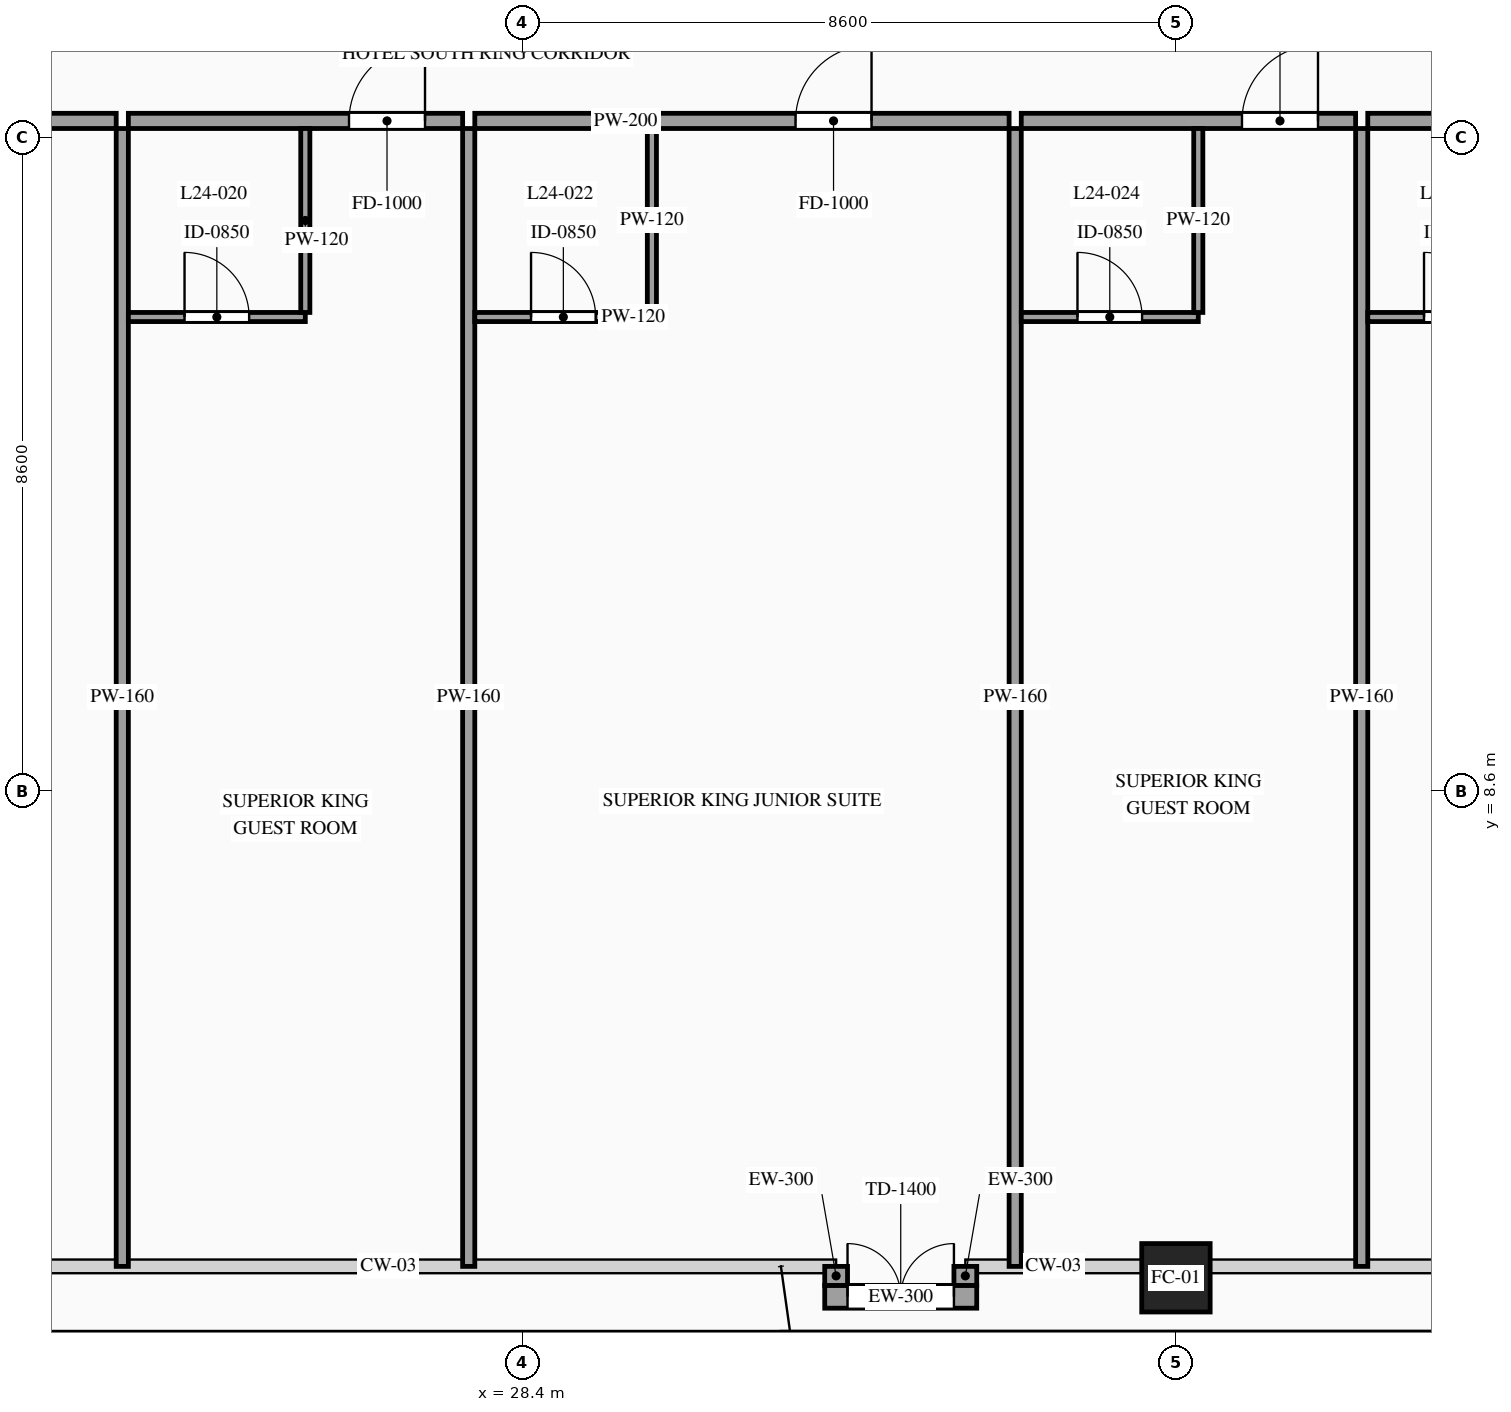
"""IFC4 building model, lengths in metres.
Left out: names, types, materials, properties, quantities, classifications, styles, units other than length and angle.
Written with IfcOpenShell. Run it as: python <this file> out.ifc"""

import sys

from ifc_helpers import new_model, si_unit, direction, frame, frame_2d, origin, origin_2d, place, context, subcontext, project, spatial, rectangle, hollow_rectangle, extrude, source, transform, mapped, element, fill, save


model = new_model("IFC4")
c1 = context("Model", 3, precision=1e-05, world=origin(), true_north=direction((0.0, 1.0)))
c2 = subcontext(c1, "Body", "Model", "MODEL_VIEW")
j1 = project(units=[si_unit("LENGTHUNIT", "METRE"), si_unit("PLANEANGLEUNIT", "RADIAN")], contexts=[c1])
p1 = place(None, origin())
s1 = spatial("IfcSite", under=j1, at=p1, CompositionType="ELEMENT")
p2 = place(p1, origin())
s2 = spatial("IfcBuilding", under=s1, at=p2, CompositionType="ELEMENT")
p3 = place(p2, frame((0.0, 0.0, 93.8)))
s3 = spatial("IfcBuildingStorey", under=s2, at=p3, CompositionType="ELEMENT", Elevation=93.8)
m1 = source(origin(), c2, "Body", "SweptSolid", [
    extrude(hollow_rectangle(XDim=0.9, YDim=0.9, WallThickness=0.042, at=origin_2d()), origin(), (0.0, 0.0, 1.0), 3.6),
])
p4 = place(p3, frame((37.0, 2.2, 0.0), z_axis=(0.0, 0.0, 1.0), x_axis=(1.0, 0.0, 0.0)))
e1 = element("IfcColumn", 1, at=p4, inside=s3, PredefinedType="COLUMN", context=c2, shape_type="MappedRepresentation", body=[
    mapped(m1, transform((0.0, 0.0, 0.0), scale=1.0)),
])
p5 = place(p3, frame((32.379, 1.95, 0.0), z_axis=(0.0, 0.0, 1.0), x_axis=(1.0, 0.0, 0.0)))
e2 = element("IfcWall", 2, at=p5, inside=s3, PredefinedType="SOLIDWALL", context=c2, shape_type="SweptSolid", body=[
    extrude(rectangle(XDim=2.0, YDim=0.3, at=frame_2d((1.0, 0.0))), origin(), (0.0, 0.0, 1.0), 3.38),
])
p6 = place(p5, frame((0.3, 0.0, 0.0)))
e3 = element("IfcOpeningElement", 3, at=p6, cuts=e2, PredefinedType="OPENING", context=c2, shape_type="SweptSolid", body=[
    extrude(rectangle(XDim=1.4, YDim=2.3, at=frame_2d((0.7, 1.15))), frame((0.0, 0.165, 0.0), z_axis=(0.0, -1.0, 0.0), x_axis=(1.0, 0.0, 0.0)), (0.0, 0.0, 1.0), 0.33),
])
m2 = source(origin(), c2, "Body", "SweptSolid", [
    extrude(rectangle(XDim=0.25, YDim=0.3, at=frame_2d((0.125, 0.0))), origin(), (0.0, 0.0, 1.0), 3.38),
])
for number, where, z_axis, x_axis in (
    (4, (32.529, 2.35, 0.0), (0.0, 0.0, 1.0), (0.0, -1.0, 0.0)),
    (5, (34.229, 2.1, 0.0), (0.0, 0.0, 1.0), (0.0, 1.0, 0.0)),
):
    element("IfcWall", number, at=place(p3, frame(where, z_axis=z_axis, x_axis=x_axis)), inside=s3, PredefinedType="SOLIDWALL", context=c2, shape_type="MappedRepresentation", body=[
        mapped(m2, transform((0.0, 0.0, 0.0), scale=1.0)),
    ])
p7 = place(p3, frame((16.44, 17.42, 0.0), z_axis=(0.0, 0.0, 1.0), x_axis=(1.0, 0.0, 0.0)))
e6 = element("IfcWall", 6, at=p7, inside=s3, PredefinedType="PARTITIONING", context=c2, shape_type="SweptSolid", body=[
    extrude(rectangle(XDim=6.617, YDim=0.2, at=frame_2d((3.309, 0.0))), origin(), (0.0, 0.0, 1.0), 3.38),
])
p8 = place(p7, frame((4.013, 0.0, 0.0)))
e7 = element("IfcOpeningElement", 7, at=p8, cuts=e6, PredefinedType="OPENING", context=c2, shape_type="SweptSolid", body=[
    extrude(rectangle(XDim=1.0, YDim=2.2, at=frame_2d((0.5, 1.1))), frame((0.0, 0.115, 0.0), z_axis=(0.0, -1.0, 0.0), x_axis=(1.0, 0.0, 0.0)), (0.0, 0.0, 1.0), 0.23),
])
m3 = source(origin(), c2, "Body", "SweptSolid", [
    extrude(rectangle(XDim=14.97, YDim=0.16, at=frame_2d((7.485, 0.0))), origin(), (0.0, 0.0, 1.0), 3.38),
])
p9 = place(p3, frame((23.137, 2.35, 0.0), z_axis=(0.0, 0.0, 1.0), x_axis=(0.0, 1.0, 0.0)))
e8 = element("IfcWall", 8, at=p9, inside=s3, PredefinedType="PARTITIONING", context=c2, shape_type="MappedRepresentation", body=[
    mapped(m3, transform((0.0, 0.0, 0.0), scale=1.0)),
])
p10 = place(p3, frame((23.217, 17.42, 0.0), z_axis=(0.0, 0.0, 1.0), x_axis=(1.0, 0.0, 0.0)))
e9 = element("IfcWall", 9, at=p10, inside=s3, PredefinedType="PARTITIONING", context=c2, shape_type="SweptSolid", body=[
    extrude(rectangle(XDim=4.398, YDim=0.2, at=frame_2d((2.199, 0.0))), origin(), (0.0, 0.0, 1.0), 3.38),
])
p11 = place(p10, frame((2.903, 0.0, 0.0)))
e10 = element("IfcOpeningElement", 10, at=p11, cuts=e9, PredefinedType="OPENING", context=c2, shape_type="SweptSolid", body=[
    extrude(rectangle(XDim=1.0, YDim=2.2, at=frame_2d((0.5, 1.1))), frame((0.0, 0.115, 0.0), z_axis=(0.0, -1.0, 0.0), x_axis=(1.0, 0.0, 0.0)), (0.0, 0.0, 1.0), 0.23),
])
p12 = place(p3, frame((27.695, 2.35, 0.0), z_axis=(0.0, 0.0, 1.0), x_axis=(0.0, 1.0, 0.0)))
e11 = element("IfcWall", 11, at=p12, inside=s3, PredefinedType="PARTITIONING", context=c2, shape_type="MappedRepresentation", body=[
    mapped(m3, transform((0.0, 0.0, 0.0), scale=1.0)),
])
p13 = place(p3, frame((23.217, 14.84, 0.0), z_axis=(0.0, 0.0, 1.0), x_axis=(1.0, 0.0, 0.0)))
e12 = element("IfcWall", 12, at=p13, inside=s3, PredefinedType="PARTITIONING", context=c2, shape_type="SweptSolid", body=[
    extrude(rectangle(XDim=2.328, YDim=0.12, at=frame_2d((1.164, 0.0))), origin(), (0.0, 0.0, 1.0), 3.38),
])
p14 = place(p13, frame((0.739, 0.0, 0.0)))
e13 = element("IfcOpeningElement", 13, at=p14, cuts=e12, PredefinedType="OPENING", context=c2, shape_type="SweptSolid", body=[
    extrude(rectangle(XDim=0.85, YDim=2.1, at=frame_2d((0.425, 1.05))), frame((0.0, 0.075, 0.0), z_axis=(0.0, -1.0, 0.0), x_axis=(1.0, 0.0, 0.0)), (0.0, 0.0, 1.0), 0.15),
])
m4 = source(origin(), c2, "Body", "SweptSolid", [
    extrude(rectangle(XDim=2.42, YDim=0.12, at=frame_2d((1.21, 0.0))), origin(), (0.0, 0.0, 1.0), 3.38),
])
p15 = place(p3, frame((25.545, 14.9, 0.0), z_axis=(0.0, 0.0, 1.0), x_axis=(0.0, 1.0, 0.0)))
e14 = element("IfcWall", 14, at=p15, inside=s3, PredefinedType="PARTITIONING", context=c2, shape_type="MappedRepresentation", body=[
    mapped(m4, transform((0.0, 0.0, 0.0), scale=1.0)),
])
p16 = place(p3, frame((27.775, 17.42, 0.0), z_axis=(0.0, 0.0, 1.0), x_axis=(1.0, 0.0, 0.0)))
e15 = element("IfcWall", 15, at=p16, inside=s3, PredefinedType="PARTITIONING", context=c2, shape_type="SweptSolid", body=[
    extrude(rectangle(XDim=7.03, YDim=0.2, at=frame_2d((3.515, 0.0))), origin(), (0.0, 0.0, 1.0), 3.38),
])
p17 = place(p16, frame((4.22, 0.0, 0.0)))
e16 = element("IfcOpeningElement", 16, at=p17, cuts=e15, PredefinedType="OPENING", context=c2, shape_type="SweptSolid", body=[
    extrude(rectangle(XDim=1.0, YDim=2.2, at=frame_2d((0.5, 1.1))), frame((0.0, 0.115, 0.0), z_axis=(0.0, -1.0, 0.0), x_axis=(1.0, 0.0, 0.0)), (0.0, 0.0, 1.0), 0.23),
])
p18 = place(p3, frame((34.885, 2.35, 0.0), z_axis=(0.0, 0.0, 1.0), x_axis=(0.0, 1.0, 0.0)))
e17 = element("IfcWall", 17, at=p18, inside=s3, PredefinedType="PARTITIONING", context=c2, shape_type="MappedRepresentation", body=[
    mapped(m3, transform((0.0, 0.0, 0.0), scale=1.0)),
])
p19 = place(p3, frame((27.775, 14.84, 0.0), z_axis=(0.0, 0.0, 1.0), x_axis=(1.0, 0.0, 0.0)))
e18 = element("IfcWall", 18, at=p19, inside=s3, PredefinedType="PARTITIONING", context=c2, shape_type="SweptSolid", body=[
    extrude(rectangle(XDim=2.33, YDim=0.12, at=frame_2d((1.165, 0.0))), origin(), (0.0, 0.0, 1.0), 3.38),
])
p20 = place(p19, frame((0.74, 0.0, 0.0)))
e19 = element("IfcOpeningElement", 19, at=p20, cuts=e18, PredefinedType="OPENING", context=c2, shape_type="SweptSolid", body=[
    extrude(rectangle(XDim=0.85, YDim=2.1, at=frame_2d((0.425, 1.05))), frame((0.0, 0.075, 0.0), z_axis=(0.0, -1.0, 0.0), x_axis=(1.0, 0.0, 0.0)), (0.0, 0.0, 1.0), 0.15),
])
p21 = place(p3, frame((30.105, 14.9, 0.0), z_axis=(0.0, 0.0, 1.0), x_axis=(0.0, 1.0, 0.0)))
e20 = element("IfcWall", 20, at=p21, inside=s3, PredefinedType="PARTITIONING", context=c2, shape_type="MappedRepresentation", body=[
    mapped(m4, transform((0.0, 0.0, 0.0), scale=1.0)),
])
p22 = place(p3, frame((34.965, 17.42, 0.0), z_axis=(0.0, 0.0, 1.0), x_axis=(1.0, 0.0, 0.0)))
e21 = element("IfcWall", 21, at=p22, inside=s3, PredefinedType="PARTITIONING", context=c2, shape_type="SweptSolid", body=[
    extrude(rectangle(XDim=4.399, YDim=0.2, at=frame_2d((2.199, 0.0))), origin(), (0.0, 0.0, 1.0), 3.38),
])
p23 = place(p22, frame((2.904, 0.0, 0.0)))
e22 = element("IfcOpeningElement", 22, at=p23, cuts=e21, PredefinedType="OPENING", context=c2, shape_type="SweptSolid", body=[
    extrude(rectangle(XDim=1.0, YDim=2.2, at=frame_2d((0.5, 1.1))), frame((0.0, 0.115, 0.0), z_axis=(0.0, -1.0, 0.0), x_axis=(1.0, 0.0, 0.0)), (0.0, 0.0, 1.0), 0.23),
])
p24 = place(p3, frame((39.444, 2.35, 0.0), z_axis=(0.0, 0.0, 1.0), x_axis=(0.0, 1.0, 0.0)))
e23 = element("IfcWall", 23, at=p24, inside=s3, PredefinedType="PARTITIONING", context=c2, shape_type="MappedRepresentation", body=[
    mapped(m3, transform((0.0, 0.0, 0.0), scale=1.0)),
])
p25 = place(p3, frame((34.965, 14.84, 0.0), z_axis=(0.0, 0.0, 1.0), x_axis=(1.0, 0.0, 0.0)))
e24 = element("IfcWall", 24, at=p25, inside=s3, PredefinedType="PARTITIONING", context=c2, shape_type="SweptSolid", body=[
    extrude(rectangle(XDim=2.329, YDim=0.12, at=frame_2d((1.165, 0.0))), origin(), (0.0, 0.0, 1.0), 3.38),
])
p26 = place(p25, frame((0.74, 0.0, 0.0)))
e25 = element("IfcOpeningElement", 25, at=p26, cuts=e24, PredefinedType="OPENING", context=c2, shape_type="SweptSolid", body=[
    extrude(rectangle(XDim=0.85, YDim=2.1, at=frame_2d((0.425, 1.05))), frame((0.0, 0.075, 0.0), z_axis=(0.0, -1.0, 0.0), x_axis=(1.0, 0.0, 0.0)), (0.0, 0.0, 1.0), 0.15),
])
p27 = place(p3, frame((37.294, 14.9, 0.0), z_axis=(0.0, 0.0, 1.0), x_axis=(0.0, 1.0, 0.0)))
e26 = element("IfcWall", 26, at=p27, inside=s3, PredefinedType="PARTITIONING", context=c2, shape_type="MappedRepresentation", body=[
    mapped(m4, transform((0.0, 0.0, 0.0), scale=1.0)),
])
p28 = place(p3, frame((39.524, 17.42, 0.0), z_axis=(0.0, 0.0, 1.0), x_axis=(1.0, 0.0, 0.0)))
e27 = element("IfcWall", 27, at=p28, inside=s3, PredefinedType="PARTITIONING", context=c2, shape_type="SweptSolid", body=[
    extrude(rectangle(XDim=7.03, YDim=0.2, at=frame_2d((3.515, 0.0))), origin(), (0.0, 0.0, 1.0), 3.38),
])
p29 = place(p28, frame((4.22, 0.0, 0.0)))
e28 = element("IfcOpeningElement", 28, at=p29, cuts=e27, PredefinedType="OPENING", context=c2, shape_type="SweptSolid", body=[
    extrude(rectangle(XDim=1.0, YDim=2.2, at=frame_2d((0.5, 1.1))), frame((0.0, 0.115, 0.0), z_axis=(0.0, -1.0, 0.0), x_axis=(1.0, 0.0, 0.0)), (0.0, 0.0, 1.0), 0.23),
])
p30 = place(p3, frame((39.524, 14.84, 0.0), z_axis=(0.0, 0.0, 1.0), x_axis=(1.0, 0.0, 0.0)))
e29 = element("IfcWall", 29, at=p30, inside=s3, PredefinedType="PARTITIONING", context=c2, shape_type="SweptSolid", body=[
    extrude(rectangle(XDim=2.33, YDim=0.12, at=frame_2d((1.165, 0.0))), origin(), (0.0, 0.0, 1.0), 3.38),
])
p31 = place(p30, frame((0.74, 0.0, 0.0)))
e30 = element("IfcOpeningElement", 30, at=p31, cuts=e29, PredefinedType="OPENING", context=c2, shape_type="SweptSolid", body=[
    extrude(rectangle(XDim=0.85, YDim=2.1, at=frame_2d((0.425, 1.05))), frame((0.0, 0.075, 0.0), z_axis=(0.0, -1.0, 0.0), x_axis=(1.0, 0.0, 0.0)), (0.0, 0.0, 1.0), 0.15),
])
m5 = source(origin(), c2, "Body", "SweptSolid", [
    extrude(rectangle(XDim=1.4, YDim=2.3, at=frame_2d((0.7, 1.15))), frame((0.0, 0.025, 0.0), z_axis=(0.0, -1.0, 0.0), x_axis=(1.0, 0.0, 0.0)), (0.0, 0.0, 1.0), 0.05),
])
p32 = place(p6, origin())
e31 = element("IfcDoor", 31, at=p32, inside=s3, OperationType="DOUBLE_DOOR_SINGLE_SWING", PredefinedType="DOOR", context=c2, shape_type="MappedRepresentation", body=[
    mapped(m5, transform((0.0, 0.0, 0.0), scale=1.0)),
])
fill(e3, e31)
m6 = source(origin(), c2, "Body", "SweptSolid", [
    extrude(rectangle(XDim=1.0, YDim=2.2, at=frame_2d((0.5, 1.1))), frame((0.0, 0.025, 0.0), z_axis=(0.0, -1.0, 0.0), x_axis=(1.0, 0.0, 0.0)), (0.0, 0.0, 1.0), 0.05),
])
p33 = place(p11, origin())
e32 = element("IfcDoor", 32, at=p33, inside=s3, OperationType="SINGLE_SWING_RIGHT", PredefinedType="DOOR", context=c2, shape_type="MappedRepresentation", body=[
    mapped(m6, transform((0.0, 0.0, 0.0), scale=1.0)),
])
fill(e10, e32)
m7 = source(origin(), c2, "Body", "SweptSolid", [
    extrude(rectangle(XDim=0.85, YDim=2.1, at=frame_2d((0.425, 1.05))), frame((0.0, 0.025, 0.0), z_axis=(0.0, -1.0, 0.0), x_axis=(1.0, 0.0, 0.0)), (0.0, 0.0, 1.0), 0.05),
])
p34 = place(p14, origin())
e33 = element("IfcDoor", 33, at=p34, inside=s3, OperationType="SINGLE_SWING_LEFT", PredefinedType="DOOR", context=c2, shape_type="MappedRepresentation", body=[
    mapped(m7, transform((0.0, 0.0, 0.0), scale=1.0)),
])
fill(e13, e33)
p35 = place(p17, origin())
e34 = element("IfcDoor", 34, at=p35, inside=s3, OperationType="SINGLE_SWING_RIGHT", PredefinedType="DOOR", context=c2, shape_type="MappedRepresentation", body=[
    mapped(m6, transform((0.0, 0.0, 0.0), scale=1.0)),
])
fill(e16, e34)
p36 = place(p20, origin())
e35 = element("IfcDoor", 35, at=p36, inside=s3, OperationType="SINGLE_SWING_LEFT", PredefinedType="DOOR", context=c2, shape_type="MappedRepresentation", body=[
    mapped(m7, transform((0.0, 0.0, 0.0), scale=1.0)),
])
fill(e19, e35)
p37 = place(p23, origin())
e36 = element("IfcDoor", 36, at=p37, inside=s3, OperationType="SINGLE_SWING_RIGHT", PredefinedType="DOOR", context=c2, shape_type="MappedRepresentation", body=[
    mapped(m6, transform((0.0, 0.0, 0.0), scale=1.0)),
])
fill(e22, e36)
p38 = place(p26, origin())
e37 = element("IfcDoor", 37, at=p38, inside=s3, OperationType="SINGLE_SWING_LEFT", PredefinedType="DOOR", context=c2, shape_type="MappedRepresentation", body=[
    mapped(m7, transform((0.0, 0.0, 0.0), scale=1.0)),
])
fill(e25, e37)
p39 = place(p31, origin())
e38 = element("IfcDoor", 38, at=p39, inside=s3, OperationType="SINGLE_SWING_LEFT", PredefinedType="DOOR", context=c2, shape_type="MappedRepresentation", body=[
    mapped(m7, transform((0.0, 0.0, 0.0), scale=1.0)),
])
fill(e30, e38)
save(model, sys.argv[1])
